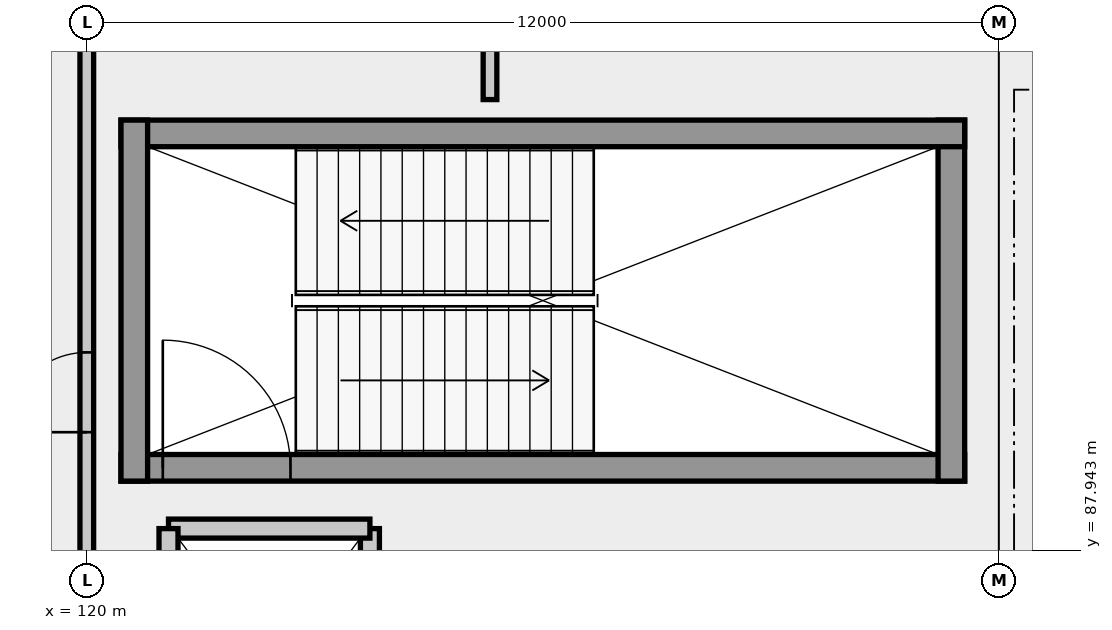
"""IFC4 building model, lengths in metres.
Left out: names, types, materials, properties, quantities, classifications, styles, units other than length and angle.
Written with IfcOpenShell. Run it as: python <this file> out.ifc"""

import sys

from ifc_helpers import new_model, si_unit, direction, frame, frame_2d, origin, place, context, subcontext, project, spatial, rectangle, extrude, element, fill, save


model = new_model("IFC4")
c1 = context("Model", 3, precision=1e-05, world=origin(), true_north=direction((0.0, 1.0)))
c2 = subcontext(c1, "Body", "Model", "MODEL_VIEW")
j1 = project(units=[si_unit("LENGTHUNIT", "METRE"), si_unit("PLANEANGLEUNIT", "RADIAN")], contexts=[c1])
p1 = place(None, origin())
s1 = spatial("IfcSite", under=j1, at=p1, CompositionType="ELEMENT")
p2 = place(p1, origin())
s2 = spatial("IfcBuilding", under=s1, at=p2, CompositionType="ELEMENT")
p3 = place(p2, frame((0.0, 0.0, 5.4)))
s3 = spatial("IfcBuildingStorey", under=s2, at=p3, CompositionType="ELEMENT", Elevation=5.4)
p4 = place(p3, frame((120.45, 89.025, 0.0), z_axis=(0.0, 0.0, 1.0), x_axis=(1.0, 0.0, 0.0)))
e1 = element("IfcWall", 1, at=p4, inside=s3, PredefinedType="SHEAR", context=c2, shape_type="SweptSolid", body=[
    extrude(rectangle(XDim=11.1, YDim=0.35, at=frame_2d((5.55, 0.0))), origin(), (0.0, 0.0, 1.0), 5.11),
])
p5 = place(p4, frame((0.55, 0.0, 0.0)))
e2 = element("IfcOpeningElement", 2, at=p5, cuts=e1, PredefinedType="OPENING", context=c2, shape_type="SweptSolid", body=[
    extrude(rectangle(XDim=1.68, YDim=2.35, at=frame_2d((0.84, 1.175))), frame((0.0, 0.185, 0.0), z_axis=(0.0, -1.0, 0.0), x_axis=(1.0, 0.0, 0.0)), (0.0, 0.0, 1.0), 0.37),
])
p6 = place(p3, frame((131.375, 88.85, 0.0), z_axis=(0.0, 0.0, 1.0), x_axis=(0.0, 1.0, 0.0)))
e3 = element("IfcWall", 3, at=p6, inside=s3, PredefinedType="SHEAR", context=c2, shape_type="SweptSolid", body=[
    extrude(rectangle(XDim=4.75, YDim=0.35, at=frame_2d((2.375, 0.0))), origin(), (0.0, 0.0, 1.0), 5.11),
])
p7 = place(p3, frame((131.55, 93.425, 0.0), z_axis=(0.0, 0.0, 1.0), x_axis=(-1.0, 0.0, 0.0)))
e4 = element("IfcWall", 4, at=p7, inside=s3, PredefinedType="SHEAR", context=c2, shape_type="SweptSolid", body=[
    extrude(rectangle(XDim=11.1, YDim=0.35, at=frame_2d((5.55, 0.0))), origin(), (0.0, 0.0, 1.0), 5.11),
])
p8 = place(p3, frame((120.625, 93.6, 0.0), z_axis=(0.0, 0.0, 1.0), x_axis=(0.0, -1.0, 0.0)))
e5 = element("IfcWall", 5, at=p8, inside=s3, PredefinedType="SHEAR", context=c2, shape_type="SweptSolid", body=[
    extrude(rectangle(XDim=4.75, YDim=0.35, at=frame_2d((2.375, 0.0))), origin(), (0.0, 0.0, 1.0), 5.11),
])
p9 = place(p3, frame((123.725, 84.775, 0.0), z_axis=(0.0, 0.0, 1.0), x_axis=(0.0, 1.0, 0.0)))
e6 = element("IfcWall", 6, at=p9, inside=s3, PredefinedType="SOLIDWALL", context=c2, shape_type="SweptSolid", body=[
    extrude(rectangle(XDim=3.45, YDim=0.25, at=frame_2d((1.725, 0.0))), origin(), (0.0, 0.0, 1.0), 5.11),
])
p10 = place(p9, frame((1.1, 0.0, 0.0)))
e7 = element("IfcOpeningElement", 7, at=p10, cuts=e6, PredefinedType="OPENING", context=c2, shape_type="SweptSolid", body=[
    extrude(rectangle(XDim=1.25, YDim=2.25, at=frame_2d((0.625, 1.125))), frame((0.0, 0.135, 0.0), z_axis=(0.0, -1.0, 0.0), x_axis=(1.0, 0.0, 0.0)), (0.0, 0.0, 1.0), 0.27),
])
p11 = place(p3, frame((123.725, 88.225, 0.0), z_axis=(0.0, 0.0, 1.0), x_axis=(-1.0, 0.0, 0.0)))
e8 = element("IfcWall", 8, at=p11, inside=s3, PredefinedType="SOLIDWALL", context=c2, shape_type="SweptSolid", body=[
    extrude(rectangle(XDim=2.65, YDim=0.25, at=frame_2d((1.325, 0.0))), origin(), (0.0, 0.0, 1.0), 5.11),
])
p12 = place(p3, frame((121.075, 88.225, 0.0), z_axis=(0.0, 0.0, 1.0), x_axis=(0.0, -1.0, 0.0)))
e9 = element("IfcWall", 9, at=p12, inside=s3, PredefinedType="SOLIDWALL", context=c2, shape_type="SweptSolid", body=[
    extrude(rectangle(XDim=3.45, YDim=0.25, at=frame_2d((1.725, 0.0))), origin(), (0.0, 0.0, 1.0), 5.11),
])
p13 = place(p3, frame((120.0, 84.594, 0.0), z_axis=(0.0, 0.0, 1.0), x_axis=(0.0, 1.0, 0.0)))
e10 = element("IfcWall", 10, at=p13, inside=s3, PredefinedType="PARTITIONING", context=c2, shape_type="SweptSolid", body=[
    extrude(rectangle(XDim=10.848, YDim=0.18, at=frame_2d((5.424, 0.0))), origin(), (0.0, 0.0, 1.0), 4.7),
])
p14 = place(p13, frame((4.899, 0.0, 0.0)))
e11 = element("IfcOpeningElement", 11, at=p14, cuts=e10, PredefinedType="OPENING", context=c2, shape_type="SweptSolid", body=[
    extrude(rectangle(XDim=1.05, YDim=2.2, at=frame_2d((0.525, 1.1))), frame((0.0, 0.1, 0.0), z_axis=(0.0, -1.0, 0.0), x_axis=(1.0, 0.0, 0.0)), (0.0, 0.0, 1.0), 0.2),
])
p15 = place(p3, frame((125.305, 93.87, 0.0), z_axis=(0.0, 0.0, 1.0), x_axis=(0.0, 1.0, 0.0)))
e12 = element("IfcWall", 12, at=p15, inside=s3, PredefinedType="PARTITIONING", context=c2, shape_type="SweptSolid", body=[
    extrude(rectangle(XDim=2.61, YDim=0.18, at=frame_2d((1.305, 0.0))), origin(), (0.0, 0.0, 1.0), 4.55),
])
p16 = place(p15, frame((0.65, 0.0, 0.0)))
e13 = element("IfcOpeningElement", 13, at=p16, cuts=e12, PredefinedType="OPENING", context=c2, shape_type="SweptSolid", body=[
    extrude(rectangle(XDim=0.92, YDim=2.15, at=frame_2d((0.46, 1.075))), frame((0.0, 0.1, 0.0), z_axis=(0.0, -1.0, 0.0), x_axis=(1.0, 0.0, 0.0)), (0.0, 0.0, 1.0), 0.2),
])
p17 = place(p5, origin())
e14 = element("IfcDoor", 14, at=p17, inside=s3, OperationType="DOUBLE_DOOR_SINGLE_SWING", PredefinedType="DOOR", context=c2, shape_type="SweptSolid", body=[
    extrude(rectangle(XDim=1.68, YDim=2.35, at=frame_2d((0.84, 1.175))), frame((0.0, 0.025, 0.0), z_axis=(0.0, -1.0, 0.0), x_axis=(1.0, 0.0, 0.0)), (0.0, 0.0, 1.0), 0.05),
])
fill(e2, e14)
p18 = place(p14, origin())
e15 = element("IfcDoor", 15, at=p18, inside=s3, OperationType="SINGLE_SWING_LEFT", PredefinedType="DOOR", context=c2, shape_type="SweptSolid", body=[
    extrude(rectangle(XDim=1.05, YDim=2.2, at=frame_2d((0.525, 1.1))), frame((0.0, 0.025, 0.0), z_axis=(0.0, -1.0, 0.0), x_axis=(1.0, 0.0, 0.0)), (0.0, 0.0, 1.0), 0.05),
])
fill(e11, e15)
save(model, sys.argv[1])
